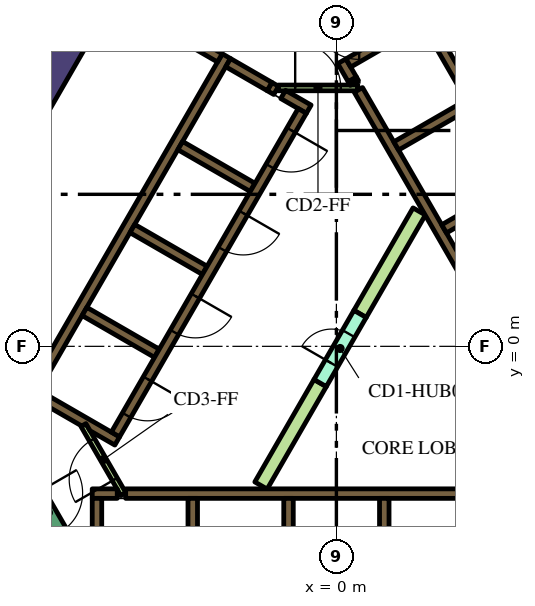
"""IFC4 building model, lengths in metres.
Left out: names, types, materials, properties, quantities, classifications, styles, units other than length and angle.
Written with IfcOpenShell. Run it as: python <this file> out.ifc"""

import sys

from ifc_helpers import new_model, si_unit, direction, frame, frame_2d, origin, place, context, subcontext, project, spatial, polyline, rectangle, outline, extrude, element, fill, save


model = new_model("IFC4")
c1 = context("Model", 3, precision=1e-05, world=origin(), true_north=direction((0.0, 1.0)))
c2 = subcontext(c1, "Body", "Model", "MODEL_VIEW")
j1 = project(units=[si_unit("LENGTHUNIT", "METRE"), si_unit("PLANEANGLEUNIT", "RADIAN")], contexts=[c1])
p1 = place(None, origin())
s1 = spatial("IfcSite", under=j1, at=p1, CompositionType="ELEMENT")
p2 = place(p1, origin())
s2 = spatial("IfcBuilding", under=s1, at=p2, CompositionType="ELEMENT")
p3 = place(p2, frame((0.0, 0.0, 183.6)))
s3 = spatial("IfcBuildingStorey", under=s2, at=p3, CompositionType="ELEMENT", Elevation=183.6)
p4 = place(p3, frame((-12.668, -1.842, 0.0), z_axis=(0.0, 0.0, 1.0), x_axis=(0.500003640647, 0.866023301845, 0.0)))
e1 = element("IfcWall", 1, at=p4, inside=s3, PredefinedType="SOLIDWALL", context=c2, shape_type="SweptSolid", body=[
    extrude(rectangle(XDim=15.858, YDim=0.8, at=frame_2d((7.929, 0.0))), origin(), (0.0, 0.0, 1.0), 4.2),
])
p5 = place(p3, frame((-5.545, -3.875, 0.0), z_axis=(0.0, 0.0, 1.0), x_axis=(1.0, 0.0, 0.0)))
e2 = element("IfcWall", 2, at=p5, inside=s3, PredefinedType="SOLIDWALL", context=c2, shape_type="SweptSolid", body=[
    extrude(rectangle(XDim=11.97, YDim=0.25, at=frame_2d((5.985, 0.0))), origin(), (0.0, 0.0, 1.0), 4.2),
])
p6 = place(p3, frame((-6.425, -3.875, 0.0), z_axis=(0.0, 0.0, 1.0), x_axis=(1.0, 0.0, 0.0)))
e3 = element("IfcWall", 3, at=p6, inside=s3, PredefinedType="SOLIDWALL", context=c2, shape_type="SweptSolid", body=[
    extrude(rectangle(XDim=0.658, YDim=0.25, at=frame_2d((0.329, 0.0))), origin(), (0.0, 0.0, 1.0), 4.2),
])
for number, where, z_axis, x_axis in (
    (4, (1.26, -4.0, 0.0), (0.0, 0.0, 1.0), (0.0, -1.0, 0.0)),
    (5, (-1.26, -4.0, 0.0), (0.0, 0.0, 1.0), (0.0, -1.0, 0.0)),
    (6, (-3.78, -4.0, 0.0), (0.0, 0.0, 1.0), (0.0, -1.0, 0.0)),
):
    element("IfcWall", number, at=place(p3, frame(where, z_axis=z_axis, x_axis=x_axis)), inside=s3, PredefinedType="SOLIDWALL", context=c2, shape_type="SweptSolid", body=[
        extrude(rectangle(XDim=2.2, YDim=0.25, at=frame_2d((1.1, 0.0))), origin(), (0.0, 0.0, 1.0), 4.2),
    ])
p7 = place(p3, frame((-6.3, -7.125, 0.0), z_axis=(0.0, 0.0, 1.0), x_axis=(0.0, 1.0, 0.0)))
e7 = element("IfcWall", 7, at=p7, inside=s3, PredefinedType="SOLIDWALL", context=c2, shape_type="SweptSolid", body=[
    extrude(rectangle(XDim=3.125, YDim=0.25, at=frame_2d((1.562, 0.0))), origin(), (0.0, 0.0, 1.0), 4.2),
])
p8 = place(p3, frame((0.473, 6.93, 0.0), z_axis=(0.0, 0.0, 1.0), x_axis=(-0.49972245349, 0.866185586049, 0.0)))
e8 = element("IfcWall", 8, at=p8, inside=s3, PredefinedType="SOLIDWALL", context=c2, shape_type="SweptSolid", body=[
    extrude(rectangle(XDim=0.11, YDim=0.25, at=frame_2d((0.055, 0.0))), origin(), (0.0, 0.0, 1.0), 4.2),
])
p9 = place(p3, frame((6.568, -3.627, 0.0), z_axis=(0.0, 0.0, 1.0), x_axis=(-0.499999455981, 0.866025717874, 0.0)))
e9 = element("IfcWall", 9, at=p9, inside=s3, PredefinedType="SOLIDWALL", context=c2, shape_type="SweptSolid", body=[
    extrude(rectangle(XDim=11.978, YDim=0.25, at=frame_2d((5.989, 0.0))), origin(), (0.0, 0.0, 1.0), 4.2),
])
p10 = place(p3, frame((0.417, 7.027, 0.0), z_axis=(0.0, 0.0, 1.0), x_axis=(-0.500210807569, 0.865903659763, 0.0)))
e10 = element("IfcWall", 10, at=p10, inside=s3, PredefinedType="SOLIDWALL", context=c2, shape_type="SweptSolid", body=[
    extrude(rectangle(XDim=0.548, YDim=0.25, at=frame_2d((0.274, 0.0))), origin(), (0.0, 0.0, 1.0), 4.2),
])
p11 = place(p3, frame((3.647, 9.38, 0.0), z_axis=(0.0, 0.0, 1.0), x_axis=(-0.866025015791, -0.500000672024, 0.0)))
e11 = element("IfcWall", 11, at=p11, inside=s3, PredefinedType="SOLIDWALL", context=c2, shape_type="SweptSolid", body=[
    extrude(rectangle(XDim=3.849, YDim=0.25, at=frame_2d((1.924, 0.0))), origin(), (0.0, 0.0, 1.0), 4.2),
])
p12 = place(p3, frame((1.574, 5.274, 0.0), z_axis=(0.0, 0.0, 1.0), x_axis=(0.866028486751, 0.499994660107, 0.0)))
e12 = element("IfcWall", 12, at=p12, inside=s3, PredefinedType="SOLIDWALL", context=c2, shape_type="SweptSolid", body=[
    extrude(rectangle(XDim=2.2, YDim=0.25, at=frame_2d((1.1, 0.0))), origin(), (0.0, 0.0, 1.0), 4.2),
])
p13 = place(p3, frame((2.834, 3.091, 0.0), z_axis=(0.0, 0.0, 1.0), x_axis=(0.866008176907, 0.50002983664, 0.0)))
e13 = element("IfcWall", 13, at=p13, inside=s3, PredefinedType="SOLIDWALL", context=c2, shape_type="SweptSolid", body=[
    extrude(rectangle(XDim=2.2, YDim=0.25, at=frame_2d((1.1, 0.0))), origin(), (0.0, 0.0, 1.0), 4.2),
])
p14 = place(p3, frame((-8.06, -1.311, 0.0), z_axis=(0.0, 0.0, 1.0), x_axis=(0.50000273126, 0.866023826885, 0.0)))
e14 = element("IfcWall", 14, at=p14, inside=s3, PredefinedType="SOLIDWALL", context=c2, shape_type="SweptSolid", body=[
    extrude(rectangle(XDim=10.33, YDim=0.25, at=frame_2d((5.165, 0.0))), origin(), (0.0, 0.0, 1.0), 4.2),
])
p15 = place(p3, frame((-1.758, 6.835, 0.0), z_axis=(0.0, 0.0, 1.0), x_axis=(0.865982457891, -0.500074377092, 0.0)))
e15 = element("IfcWall", 15, at=p15, inside=s3, PredefinedType="SOLIDWALL", context=c2, shape_type="SweptSolid", body=[
    extrude(rectangle(XDim=0.2, YDim=0.25, at=frame_2d((0.1, 0.0))), origin(), (0.0, 0.0, 1.0), 4.2),
])
p16 = place(p3, frame((-1.76, 6.836, 0.0), z_axis=(0.0, 0.0, 1.0), x_axis=(-0.865952863304, 0.500125622755, 0.0)))
e16 = element("IfcWall", 16, at=p16, inside=s3, PredefinedType="SOLIDWALL", context=c2, shape_type="SweptSolid", body=[
    extrude(rectangle(XDim=1.258, YDim=0.25, at=frame_2d((0.629, 0.0))), origin(), (0.0, 0.0, 1.0), 4.2),
])
p17 = place(p3, frame((-0.728, 6.24, 0.0), z_axis=(0.0, 0.0, 1.0), x_axis=(-0.865955664968, 0.500120771724, 0.0)))
e17 = element("IfcWall", 17, at=p17, inside=s3, PredefinedType="SOLIDWALL", context=c2, shape_type="SweptSolid", body=[
    extrude(rectangle(XDim=0.778, YDim=0.25, at=frame_2d((0.389, 0.0))), origin(), (0.0, 0.0, 1.0), 4.2),
])
for number, where, z_axis, x_axis in (
    (18, (-2.204, 4.182, 0.0), (0.0, 0.0, 1.0), (-0.866, 0.5, 0.0)),
    (19, (-5.369, 3.1, 0.0), (0.0, 0.0, 1.0), (0.866, -0.5, 0.0)),
    (20, (-4.724, -0.182, 0.0), (0.0, 0.0, 1.0), (-0.866, 0.5, 0.0)),
):
    element("IfcWall", number, at=place(p3, frame(where, z_axis=z_axis, x_axis=x_axis)), inside=s3, PredefinedType="SOLIDWALL", context=c2, shape_type="SweptSolid", body=[
        extrude(rectangle(XDim=2.2, YDim=0.25, at=frame_2d((1.1, 0.0))), origin(), (0.0, 0.0, 1.0), 4.2),
    ])
p18 = place(p3, origin())
e21 = element("IfcWall", 21, at=p18, inside=s3, PredefinedType="SOLIDWALL", context=c2, shape_type="SweptSolid", body=[
    extrude(outline(polyline([(-5.922, -2.257), (-5.922, -2.257), (-5.705, -2.382), (-5.83, -2.598), (-6.483, -2.221), (-6.591, -2.033), (-6.591, -2.033), (-6.7, -2.096), (-7.952, -1.373), (-7.827, -1.156), (-5.922, -2.257)])), origin(), (0.0, 0.0, 1.0), 4.2),
])
p19 = place(p3, frame((-3.066, 7.59, 0.0), z_axis=(0.0, 0.0, 1.0), x_axis=(-0.866081358704, 0.49990307071, 0.0)))
e22 = element("IfcWall", 22, at=p19, inside=s3, PredefinedType="SOLIDWALL", context=c2, shape_type="SweptSolid", body=[
    extrude(rectangle(XDim=0.858, YDim=0.25, at=frame_2d((0.429, 0.0))), origin(), (0.0, 0.0, 1.0), 4.2),
])
e23 = element("IfcWall", 23, at=p18, inside=s3, PredefinedType="PARTITIONING", context=c2, shape_type="SweptSolid", body=[
    extrude(outline(polyline([(2.017, 3.643), (2.342, 3.456), (0.785, 0.76), (0.46, 0.947), (2.017, 3.643)])), origin(), (0.0, 0.0, 1.0), 3.15),
])
e24 = element("IfcWall", 24, at=p18, inside=s3, PredefinedType="PARTITIONING", context=c2, shape_type="SweptSolid", body=[
    extrude(outline(polyline([(-0.59, -0.872), (-0.265, -1.059), (-1.822, -3.756), (-2.147, -3.568), (-0.59, -0.872)])), origin(), (0.0, 0.0, 1.0), 3.15),
])
p20 = place(p3, frame((8.565, -2.185, 0.0), z_axis=(0.0, 0.0, 1.0), x_axis=(-0.499997954832, 0.866026584559, 0.0)))
e25 = element("IfcWall", 25, at=p20, inside=s3, PredefinedType="SOLIDWALL", context=c2, shape_type="SweptSolid", body=[
    extrude(rectangle(XDim=12.35, YDim=0.25, at=frame_2d((6.175, 0.0))), origin(), (0.0, 0.0, 1.0), 4.2),
])
p21 = place(p20, frame((0.585, 0.0, 0.0)))
e26 = element("IfcOpeningElement", 26, at=p21, cuts=e25, PredefinedType="OPENING", context=c2, shape_type="SweptSolid", body=[
    extrude(rectangle(XDim=1.1, YDim=2.1, at=frame_2d((0.55, 1.05))), frame((0.0, 0.135, 0.0), z_axis=(0.0, -1.0, 0.0), x_axis=(1.0, 0.0, 0.0)), (0.0, 0.0, 1.0), 0.27),
])
p22 = place(p3, frame((-0.898, 6.194, 0.0), z_axis=(0.0, 0.0, 1.0), x_axis=(-0.499996202215, -0.866027596426, 0.0)))
e27 = element("IfcWall", 27, at=p22, inside=s3, PredefinedType="SOLIDWALL", context=c2, shape_type="SweptSolid", body=[
    extrude(rectangle(XDim=9.83, YDim=0.25, at=frame_2d((4.915, 0.0))), origin(), (0.0, 0.0, 1.0), 4.2),
])
p23 = place(p22, frame((0.585, 0.0, 0.0)))
e28 = element("IfcOpeningElement", 28, at=p23, cuts=e27, PredefinedType="OPENING", context=c2, shape_type="SweptSolid", body=[
    extrude(rectangle(XDim=1.1, YDim=2.1, at=frame_2d((0.55, 1.05))), frame((0.0, 0.135, 0.0), z_axis=(0.0, -1.0, 0.0), x_axis=(1.0, 0.0, 0.0)), (0.0, 0.0, 1.0), 0.27),
])
p24 = place(p22, frame((3.105, 0.0, 0.0)))
e29 = element("IfcOpeningElement", 29, at=p24, cuts=e27, PredefinedType="OPENING", context=c2, shape_type="SweptSolid", body=[
    extrude(rectangle(XDim=1.1, YDim=2.1, at=frame_2d((0.55, 1.05))), frame((0.0, 0.135, 0.0), z_axis=(0.0, -1.0, 0.0), x_axis=(1.0, 0.0, 0.0)), (0.0, 0.0, 1.0), 0.27),
])
p25 = place(p22, frame((5.625, 0.0, 0.0)))
e30 = element("IfcOpeningElement", 30, at=p25, cuts=e27, PredefinedType="OPENING", context=c2, shape_type="SweptSolid", body=[
    extrude(rectangle(XDim=1.1, YDim=2.1, at=frame_2d((0.55, 1.05))), frame((0.0, 0.135, 0.0), z_axis=(0.0, -1.0, 0.0), x_axis=(1.0, 0.0, 0.0)), (0.0, 0.0, 1.0), 0.27),
])
p26 = place(p22, frame((8.145, 0.0, 0.0)))
e31 = element("IfcOpeningElement", 31, at=p26, cuts=e27, PredefinedType="OPENING", context=c2, shape_type="SweptSolid", body=[
    extrude(rectangle(XDim=1.1, YDim=2.1, at=frame_2d((0.55, 1.05))), frame((0.0, 0.135, 0.0), z_axis=(0.0, -1.0, 0.0), x_axis=(1.0, 0.0, 0.0)), (0.0, 0.0, 1.0), 0.27),
])
p27 = place(p3, frame((-8.103, -3.466, 0.0), z_axis=(0.0, 0.0, 1.0), x_axis=(0.500078061341, -0.865980330357, 0.0)))
e32 = element("IfcWall", 32, at=p27, inside=s3, PredefinedType="SOLIDWALL", context=c2, shape_type="SweptSolid", body=[
    extrude(rectangle(XDim=2.1, YDim=0.4, at=frame_2d((1.05, 0.0))), origin(), (0.0, 0.0, 1.0), 4.2),
])
p28 = place(p27, frame((0.45, 0.0, 0.0)))
e33 = element("IfcOpeningElement", 33, at=p28, cuts=e32, PredefinedType="OPENING", context=c2, shape_type="SweptSolid", body=[
    extrude(rectangle(XDim=1.2, YDim=2.1, at=frame_2d((0.6, 1.05))), frame((0.0, 0.21, 0.0), z_axis=(0.0, -1.0, 0.0), x_axis=(1.0, 0.0, 0.0)), (0.0, 0.0, 1.0), 0.42),
])
p29 = place(p3, frame((-0.427, -0.966, 0.0), z_axis=(0.0, 0.0, 1.0), x_axis=(0.49994051562, 0.866059744384, 0.0)))
e34 = element("IfcWall", 34, at=p29, inside=s3, PredefinedType="PARTITIONING", context=c2, shape_type="SweptSolid", body=[
    extrude(rectangle(XDim=2.1, YDim=0.375, at=frame_2d((1.05, 0.0))), origin(), (0.0, 0.0, 1.0), 3.15),
])
p30 = place(p29, frame((0.6, 0.0, 0.0)))
e35 = element("IfcOpeningElement", 35, at=p30, cuts=e34, PredefinedType="OPENING", context=c2, shape_type="SweptSolid", body=[
    extrude(rectangle(XDim=0.9, YDim=2.1, at=frame_2d((0.45, 1.05))), frame((0.0, 0.198, 0.0), z_axis=(0.0, -1.0, 0.0), x_axis=(1.0, 0.0, 0.0)), (0.0, 0.0, 1.0), 0.395),
])
p31 = place(p3, frame((-1.534, 6.8, 0.0), z_axis=(0.0, 0.0, 1.0), x_axis=(1.0, 0.0, 0.0)))
e36 = element("IfcWall", 36, at=p31, inside=s3, PredefinedType="PARTITIONING", context=c2, shape_type="SweptSolid", body=[
    extrude(rectangle(XDim=2.1, YDim=0.15, at=frame_2d((1.05, 0.0))), origin(), (0.0, 0.0, 1.0), 3.15),
])
p32 = place(p31, frame((0.45, 0.0, 0.0)))
e37 = element("IfcOpeningElement", 37, at=p32, cuts=e36, PredefinedType="OPENING", context=c2, shape_type="SweptSolid", body=[
    extrude(rectangle(XDim=1.2, YDim=2.1, at=frame_2d((0.6, 1.05))), frame((0.0, 0.085, 0.0), z_axis=(0.0, -1.0, 0.0), x_axis=(1.0, 0.0, 0.0)), (0.0, 0.0, 1.0), 0.17),
])
p33 = place(p3, frame((-5.606, -3.89, 0.0), z_axis=(0.0, 0.0, 1.0), x_axis=(-0.500027713859, 0.866009402589, 0.0)))
e38 = element("IfcWall", 38, at=p33, inside=s3, PredefinedType="PARTITIONING", context=c2, shape_type="SweptSolid", body=[
    extrude(rectangle(XDim=2.1, YDim=0.15, at=frame_2d((1.05, 0.0))), origin(), (0.0, 0.0, 1.0), 3.15),
])
p34 = place(p33, frame((0.45, 0.0, 0.0)))
e39 = element("IfcOpeningElement", 39, at=p34, cuts=e38, PredefinedType="OPENING", context=c2, shape_type="SweptSolid", body=[
    extrude(rectangle(XDim=1.2, YDim=2.1, at=frame_2d((0.6, 1.05))), frame((0.0, 0.085, 0.0), z_axis=(0.0, -1.0, 0.0), x_axis=(1.0, 0.0, 0.0)), (0.0, 0.0, 1.0), 0.17),
])
p35 = place(p23, origin())
e40 = element("IfcDoor", 40, at=p35, inside=s3, OperationType="DOUBLE_DOOR_SLIDING", PredefinedType="DOOR", context=c2, shape_type="SweptSolid", body=[
    extrude(rectangle(XDim=1.1, YDim=2.1, at=frame_2d((0.55, 1.05))), frame((0.0, 0.025, 0.0), z_axis=(0.0, -1.0, 0.0), x_axis=(1.0, 0.0, 0.0)), (0.0, 0.0, 1.0), 0.05),
])
fill(e28, e40)
p36 = place(p24, origin())
e41 = element("IfcDoor", 41, at=p36, inside=s3, OperationType="DOUBLE_DOOR_SLIDING", PredefinedType="DOOR", context=c2, shape_type="SweptSolid", body=[
    extrude(rectangle(XDim=1.1, YDim=2.1, at=frame_2d((0.55, 1.05))), frame((0.0, 0.025, 0.0), z_axis=(0.0, -1.0, 0.0), x_axis=(1.0, 0.0, 0.0)), (0.0, 0.0, 1.0), 0.05),
])
fill(e29, e41)
p37 = place(p25, origin())
e42 = element("IfcDoor", 42, at=p37, inside=s3, OperationType="DOUBLE_DOOR_SLIDING", PredefinedType="DOOR", context=c2, shape_type="SweptSolid", body=[
    extrude(rectangle(XDim=1.1, YDim=2.1, at=frame_2d((0.55, 1.05))), frame((0.0, 0.025, 0.0), z_axis=(0.0, -1.0, 0.0), x_axis=(1.0, 0.0, 0.0)), (0.0, 0.0, 1.0), 0.05),
])
fill(e30, e42)
p38 = place(p26, origin())
e43 = element("IfcDoor", 43, at=p38, inside=s3, OperationType="DOUBLE_DOOR_SLIDING", PredefinedType="DOOR", context=c2, shape_type="SweptSolid", body=[
    extrude(rectangle(XDim=1.1, YDim=2.1, at=frame_2d((0.55, 1.05))), frame((0.0, 0.025, 0.0), z_axis=(0.0, -1.0, 0.0), x_axis=(1.0, 0.0, 0.0)), (0.0, 0.0, 1.0), 0.05),
])
fill(e31, e43)
p39 = place(p28, origin())
e44 = element("IfcDoor", 44, at=p39, inside=s3, OperationType="SINGLE_SWING_LEFT", PredefinedType="DOOR", context=c2, shape_type="SweptSolid", body=[
    extrude(rectangle(XDim=1.2, YDim=2.1, at=frame_2d((0.6, 1.05))), frame((0.0, 0.025, 0.0), z_axis=(0.0, -1.0, 0.0), x_axis=(1.0, 0.0, 0.0)), (0.0, 0.0, 1.0), 0.05),
])
fill(e33, e44)
p40 = place(p30, origin())
e45 = element("IfcDoor", 45, at=p40, inside=s3, OperationType="SINGLE_SWING_LEFT", PredefinedType="DOOR", context=c2, shape_type="SweptSolid", body=[
    extrude(rectangle(XDim=0.9, YDim=2.1, at=frame_2d((0.45, 1.05))), frame((0.0, 0.025, 0.0), z_axis=(0.0, -1.0, 0.0), x_axis=(1.0, 0.0, 0.0)), (0.0, 0.0, 1.0), 0.05),
])
fill(e35, e45)
p41 = place(p32, origin())
e46 = element("IfcDoor", 46, at=p41, inside=s3, OperationType="SINGLE_SWING_LEFT", PredefinedType="DOOR", context=c2, shape_type="SweptSolid", body=[
    extrude(rectangle(XDim=1.2, YDim=2.1, at=frame_2d((0.6, 1.05))), frame((0.0, 0.025, 0.0), z_axis=(0.0, -1.0, 0.0), x_axis=(1.0, 0.0, 0.0)), (0.0, 0.0, 1.0), 0.05),
])
fill(e37, e46)
p42 = place(p34, origin())
e47 = element("IfcDoor", 47, at=p42, inside=s3, OperationType="SINGLE_SWING_LEFT", PredefinedType="DOOR", context=c2, shape_type="SweptSolid", body=[
    extrude(rectangle(XDim=1.2, YDim=2.1, at=frame_2d((0.6, 1.05))), frame((0.0, 0.025, 0.0), z_axis=(0.0, -1.0, 0.0), x_axis=(1.0, 0.0, 0.0)), (0.0, 0.0, 1.0), 0.05),
])
fill(e39, e47)
save(model, sys.argv[1])
